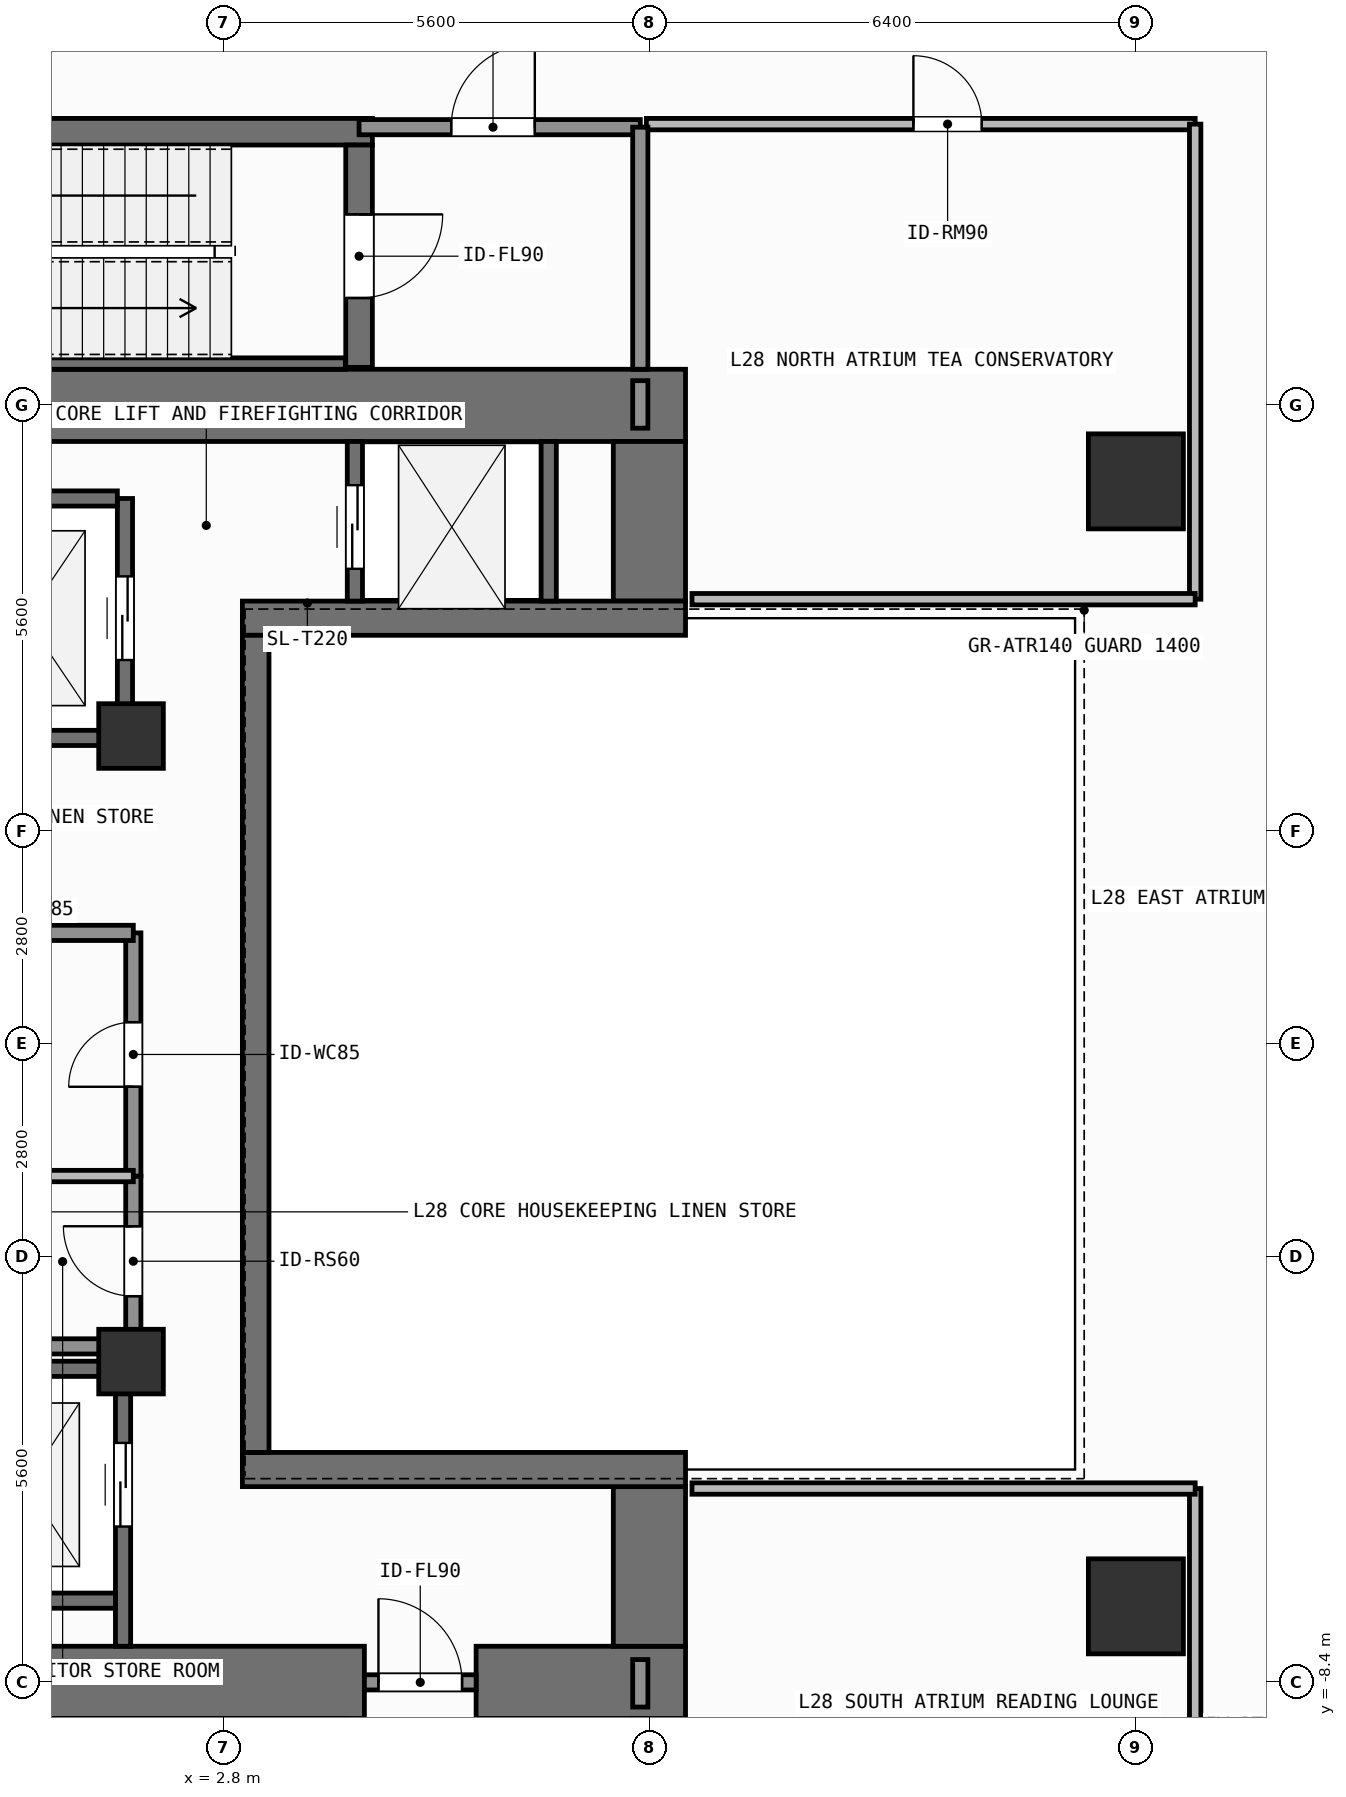
"""IFC4 building model, lengths in metres.
Left out: names, types, materials, properties, quantities, classifications, styles, units other than length and angle.
Written with IfcOpenShell. Run it as: python <this file> out.ifc"""

import sys

from ifc_helpers import new_model, si_unit, direction, frame, frame_2d, origin, origin_2d, place, context, subcontext, project, spatial, rectangle, extrude, element, fill, save


model = new_model("IFC4")
c1 = context("Model", 3, precision=1e-05, world=origin(), true_north=direction((0.0, 1.0)))
c2 = subcontext(c1, "Body", "Model", "MODEL_VIEW")
j1 = project(units=[si_unit("LENGTHUNIT", "METRE"), si_unit("PLANEANGLEUNIT", "RADIAN")], contexts=[c1])
p1 = place(None, origin())
s1 = spatial("IfcSite", under=j1, at=p1, CompositionType="ELEMENT")
p2 = place(p1, origin())
s2 = spatial("IfcBuilding", under=s1, at=p2, CompositionType="ELEMENT")
p3 = place(p2, frame((0.0, 0.0, 113.4)))
s3 = spatial("IfcBuildingStorey", under=s2, at=p3, CompositionType="ELEMENT", Elevation=113.4)
p4 = place(p3, frame((-2.62, -8.4, 0.0), z_axis=(0.0, 0.0, 1.0), x_axis=(1.0, 0.0, 0.0)))
e1 = element("IfcWall", 1, at=p4, inside=s3, PredefinedType="SHEAR", context=c2, shape_type="SweptSolid", body=[
    extrude(rectangle(XDim=7.27, YDim=0.95, at=frame_2d((3.635, 0.0))), origin(), (0.0, 0.0, 1.0), 3.9),
])
p5 = place(p3, frame((6.12, -8.4, 0.0), z_axis=(0.0, 0.0, 1.0), x_axis=(1.0, 0.0, 0.0)))
e2 = element("IfcWall", 2, at=p5, inside=s3, PredefinedType="SHEAR", context=c2, shape_type="SweptSolid", body=[
    extrude(rectangle(XDim=2.755, YDim=0.95, at=frame_2d((1.377, 0.0))), origin(), (0.0, 0.0, 1.0), 3.9),
])
p6 = place(p3, frame((-7.55, 8.4, 0.0), z_axis=(0.0, 0.0, 1.0), x_axis=(1.0, 0.0, 0.0)))
e3 = element("IfcWall", 3, at=p6, inside=s3, PredefinedType="SHEAR", context=c2, shape_type="SweptSolid", body=[
    extrude(rectangle(XDim=16.425, YDim=0.95, at=frame_2d((8.212, 0.0))), origin(), (0.0, 0.0, 1.0), 3.9),
])
for number, where, z_axis, x_axis in (
    (4, (8.4, -7.925, 0.0), (0.0, 0.0, 1.0), (0.0, 1.0, 0.0)),
    (5, (8.4, 5.825, 0.0), (0.0, 0.0, 1.0), (0.0, 1.0, 0.0)),
):
    element("IfcWall", number, at=place(p3, frame(where, z_axis=z_axis, x_axis=x_axis)), inside=s3, PredefinedType="SHEAR", context=c2, shape_type="SweptSolid", body=[
        extrude(rectangle(XDim=2.1, YDim=0.95, at=frame_2d((1.05, 0.0))), origin(), (0.0, 0.0, 1.0), 3.9),
    ])
for number, where, z_axis, x_axis in (
    (6, (3.045, -5.6, 0.0), (0.0, 0.0, 1.0), (1.0, 0.0, 0.0)),
    (7, (3.045, 5.6, 0.0), (0.0, 0.0, 1.0), (1.0, 0.0, 0.0)),
):
    element("IfcWall", number, at=place(p3, frame(where, z_axis=z_axis, x_axis=x_axis)), inside=s3, PredefinedType="SHEAR", context=c2, shape_type="SweptSolid", body=[
        extrude(rectangle(XDim=5.83, YDim=0.45, at=frame_2d((2.915, 0.0))), origin(), (0.0, 0.0, 1.0), 3.9),
    ])
p7 = place(p3, frame((3.22, -5.375, 0.0), z_axis=(0.0, 0.0, 1.0), x_axis=(0.0, 1.0, 0.0)))
e8 = element("IfcWall", 8, at=p7, inside=s3, PredefinedType="SHEAR", context=c2, shape_type="SweptSolid", body=[
    extrude(rectangle(XDim=10.75, YDim=0.35, at=frame_2d((5.375, 0.0))), origin(), (0.0, 0.0, 1.0), 3.9),
])
p8 = place(p3, frame((-2.555, 12.0, 0.0), z_axis=(0.0, 0.0, 1.0), x_axis=(1.0, 0.0, 0.0)))
e9 = element("IfcWall", 9, at=p8, inside=s3, PredefinedType="SHEAR", context=c2, shape_type="SweptSolid", body=[
    extrude(rectangle(XDim=7.31, YDim=0.35, at=frame_2d((3.655, 0.0))), origin(), (0.0, 0.0, 1.0), 3.9),
])
p9 = place(p3, frame((-2.2, 8.95, 0.0), z_axis=(0.0, 0.0, 1.0), x_axis=(1.0, 0.0, 0.0)))
e10 = element("IfcWall", 10, at=p9, inside=s3, PredefinedType="SHEAR", context=c2, shape_type="SweptSolid", body=[
    extrude(rectangle(XDim=6.6, YDim=0.15, at=frame_2d((3.3, 0.0))), origin(), (0.0, 0.0, 1.0), 3.9),
])
p10 = place(p3, frame((4.58, 11.825, 0.0), z_axis=(0.0, 0.0, 1.0), x_axis=(0.0, -1.0, 0.0)))
e11 = element("IfcWall", 11, at=p10, inside=s3, PredefinedType="SHEAR", context=c2, shape_type="SweptSolid", body=[
    extrude(rectangle(XDim=2.925, YDim=0.35, at=frame_2d((1.462, 0.0))), origin(), (0.0, 0.0, 1.0), 3.9),
])
p11 = place(p10, frame((0.913, 0.0, 0.0)))
e12 = element("IfcOpeningElement", 12, at=p11, cuts=e11, PredefinedType="OPENING", context=c2, shape_type="SweptSolid", body=[
    extrude(rectangle(XDim=1.1, YDim=2.15, at=frame_2d((0.55, 1.075))), frame((0.0, 0.185, 0.0), z_axis=(0.0, -1.0, 0.0), x_axis=(1.0, 0.0, 0.0)), (0.0, 0.0, 1.0), 0.37),
])
for number, where, z_axis, x_axis in (
    (13, (14.8, -7.4, 0.0), (0.0, 0.0, 1.0), (1.0, 0.0, 0.0)),
    (14, (14.8, 7.4, 0.0), (0.0, 0.0, 1.0), (1.0, 0.0, 0.0)),
):
    element("IfcColumn", number, at=place(p3, frame(where, z_axis=z_axis, x_axis=x_axis)), inside=s3, PredefinedType="COLUMN", context=c2, shape_type="SweptSolid", body=[
        extrude(rectangle(XDim=1.25, YDim=1.25, at=origin_2d()), origin(), (0.0, 0.0, 1.0), 3.9),
    ])
for number, where, z_axis, x_axis in (
    (15, (1.58, -4.18, 0.0), (0.0, 0.0, 1.0), (1.0, 0.0, 0.0)),
    (16, (1.58, 4.05, 0.0), (0.0, 0.0, 1.0), (1.0, 0.0, 0.0)),
):
    element("IfcColumn", number, at=place(p3, frame(where, z_axis=z_axis, x_axis=x_axis)), inside=s3, PredefinedType="COLUMN", context=c2, shape_type="SweptSolid", body=[
        extrude(rectangle(XDim=0.85, YDim=0.85, at=origin_2d()), origin(), (0.0, 0.0, 1.0), 3.9),
    ])
p12 = place(p3, frame((1.5, 4.025, 0.0), z_axis=(0.0, 0.0, 1.0), x_axis=(0.0, 1.0, 0.0)))
e17 = element("IfcWall", 17, at=p12, inside=s3, PredefinedType="SHEAR", context=c2, shape_type="SweptSolid", body=[
    extrude(rectangle(XDim=3.15, YDim=0.2, at=frame_2d((1.575, 0.0))), origin(), (0.0, 0.0, 1.0), 3.68),
])
p13 = place(p12, frame((1.025, 0.0, 0.0)))
e18 = element("IfcOpeningElement", 18, at=p13, cuts=e17, PredefinedType="OPENING", context=c2, shape_type="SweptSolid", body=[
    extrude(rectangle(XDim=1.1, YDim=2.2, at=frame_2d((0.55, 1.1))), frame((0.0, 0.11, 0.0), z_axis=(0.0, -1.0, 0.0), x_axis=(1.0, 0.0, 0.0)), (0.0, 0.0, 1.0), 0.22),
])
for number, where, z_axis, x_axis in (
    (19, (-1.0, 4.025, 0.0), (0.0, 0.0, 1.0), (1.0, 0.0, 0.0)),
    (20, (-1.0, 7.175, 0.0), (0.0, 0.0, 1.0), (1.0, 0.0, 0.0)),
):
    element("IfcWall", number, at=place(p3, frame(where, z_axis=z_axis, x_axis=x_axis)), inside=s3, PredefinedType="SHEAR", context=c2, shape_type="SweptSolid", body=[
        extrude(rectangle(XDim=2.4, YDim=0.2, at=frame_2d((1.2, 0.0))), origin(), (0.0, 0.0, 1.0), 3.68),
    ])
p14 = place(p3, frame((1.475, -7.925, 0.0), z_axis=(0.0, 0.0, 1.0), x_axis=(0.0, 1.0, 0.0)))
e21 = element("IfcWall", 21, at=p14, inside=s3, PredefinedType="SHEAR", context=c2, shape_type="SweptSolid", body=[
    extrude(rectangle(XDim=3.65, YDim=0.2, at=frame_2d((1.825, 0.0))), origin(), (0.0, 0.0, 1.0), 3.68),
])
p15 = place(p14, frame((1.575, 0.0, 0.0)))
e22 = element("IfcOpeningElement", 22, at=p15, cuts=e21, PredefinedType="OPENING", context=c2, shape_type="SweptSolid", body=[
    extrude(rectangle(XDim=1.1, YDim=2.2, at=frame_2d((0.55, 1.1))), frame((0.0, 0.11, 0.0), z_axis=(0.0, -1.0, 0.0), x_axis=(1.0, 0.0, 0.0)), (0.0, 0.0, 1.0), 0.22),
])
for number, where, z_axis, x_axis in (
    (23, (-0.975, -7.325, 0.0), (0.0, 0.0, 1.0), (1.0, 0.0, 0.0)),
    (24, (-0.975, -4.275, 0.0), (0.0, 0.0, 1.0), (1.0, 0.0, 0.0)),
):
    element("IfcWall", number, at=place(p3, frame(where, z_axis=z_axis, x_axis=x_axis)), inside=s3, PredefinedType="SHEAR", context=c2, shape_type="SweptSolid", body=[
        extrude(rectangle(XDim=2.35, YDim=0.2, at=frame_2d((1.175, 0.0))), origin(), (0.0, 0.0, 1.0), 3.68),
    ])
p16 = place(p3, frame((4.525, 5.825, 0.0), z_axis=(0.0, 0.0, 1.0), x_axis=(0.0, 1.0, 0.0)))
e25 = element("IfcWall", 25, at=p16, inside=s3, PredefinedType="SHEAR", context=c2, shape_type="SweptSolid", body=[
    extrude(rectangle(XDim=2.1, YDim=0.2, at=frame_2d((1.05, 0.0))), origin(), (0.0, 0.0, 1.0), 3.68),
])
p17 = place(p16, frame((0.425, 0.0, 0.0)))
e26 = element("IfcOpeningElement", 26, at=p17, cuts=e25, PredefinedType="OPENING", context=c2, shape_type="SweptSolid", body=[
    extrude(rectangle(XDim=1.1, YDim=2.2, at=frame_2d((0.55, 1.1))), frame((0.0, 0.11, 0.0), z_axis=(0.0, -1.0, 0.0), x_axis=(1.0, 0.0, 0.0)), (0.0, 0.0, 1.0), 0.22),
])
p18 = place(p3, frame((7.075, 5.825, 0.0), z_axis=(0.0, 0.0, 1.0), x_axis=(0.0, 1.0, 0.0)))
e27 = element("IfcWall", 27, at=p18, inside=s3, PredefinedType="SHEAR", context=c2, shape_type="SweptSolid", body=[
    extrude(rectangle(XDim=2.1, YDim=0.2, at=frame_2d((1.05, 0.0))), origin(), (0.0, 0.0, 1.0), 3.68),
])
p19 = place(p3, frame((4.65, -8.4, 0.0), z_axis=(0.0, 0.0, 1.0), x_axis=(1.0, 0.0, 0.0)))
e28 = element("IfcWall", 28, at=p19, inside=s3, PredefinedType="SOLIDWALL", context=c2, shape_type="SweptSolid", body=[
    extrude(rectangle(XDim=1.47, YDim=0.2, at=frame_2d((0.735, 0.0))), origin(), (0.0, 0.0, 1.0), 2.72),
])
p20 = place(p19, frame((0.185, 0.0, 0.0)))
e29 = element("IfcOpeningElement", 29, at=p20, cuts=e28, PredefinedType="OPENING", context=c2, shape_type="SweptSolid", body=[
    extrude(rectangle(XDim=1.1, YDim=2.15, at=frame_2d((0.55, 1.075))), frame((0.0, 0.11, 0.0), z_axis=(0.0, -1.0, 0.0), x_axis=(1.0, 0.0, 0.0)), (0.0, 0.0, 1.0), 0.22),
])
p21 = place(p3, frame((4.58, 12.06, 0.0), z_axis=(0.0, 0.0, 1.0), x_axis=(1.0, 0.0, 0.0)))
e30 = element("IfcWall", 30, at=p21, inside=s3, PredefinedType="SOLIDWALL", context=c2, shape_type="SweptSolid", body=[
    extrude(rectangle(XDim=3.7, YDim=0.2, at=frame_2d((1.85, 0.0))), origin(), (0.0, 0.0, 1.0), 3.68),
])
p22 = place(p21, frame((1.212, 0.0, 0.0)))
e31 = element("IfcOpeningElement", 31, at=p22, cuts=e30, PredefinedType="OPENING", context=c2, shape_type="SweptSolid", body=[
    extrude(rectangle(XDim=1.1, YDim=2.15, at=frame_2d((0.55, 1.075))), frame((0.0, 0.11, 0.0), z_axis=(0.0, -1.0, 0.0), x_axis=(1.0, 0.0, 0.0)), (0.0, 0.0, 1.0), 0.22),
])
p23 = place(p3, frame((1.61, -3.98, 0.0), z_axis=(0.0, 0.0, 1.0), x_axis=(0.0, 1.0, 0.0)))
e32 = element("IfcWall", 32, at=p23, inside=s3, PredefinedType="SOLIDWALL", context=c2, shape_type="SweptSolid", body=[
    extrude(rectangle(XDim=2.241, YDim=0.2, at=frame_2d((1.121, 0.0))), origin(), (0.0, 0.0, 1.0), 3.68),
])
p24 = place(p23, frame((0.66, 0.0, 0.0)))
e33 = element("IfcOpeningElement", 33, at=p24, cuts=e32, PredefinedType="OPENING", context=c2, shape_type="SweptSolid", body=[
    extrude(rectangle(XDim=0.92, YDim=2.1, at=frame_2d((0.46, 1.05))), frame((0.0, 0.11, 0.0), z_axis=(0.0, -1.0, 0.0), x_axis=(1.0, 0.0, 0.0)), (0.0, 0.0, 1.0), 0.22),
])
p25 = place(p3, frame((1.61, -1.739, 0.0), z_axis=(0.0, 0.0, 1.0), x_axis=(0.0, 1.0, 0.0)))
e34 = element("IfcWall", 34, at=p25, inside=s3, PredefinedType="SOLIDWALL", context=c2, shape_type="SweptSolid", body=[
    extrude(rectangle(XDim=3.199, YDim=0.2, at=frame_2d((1.6, 0.0))), origin(), (0.0, 0.0, 1.0), 3.68),
])
p26 = place(p25, frame((1.175, 0.0, 0.0)))
e35 = element("IfcOpeningElement", 35, at=p26, cuts=e34, PredefinedType="OPENING", context=c2, shape_type="SweptSolid", body=[
    extrude(rectangle(XDim=0.85, YDim=2.1, at=frame_2d((0.425, 1.05))), frame((0.0, 0.11, 0.0), z_axis=(0.0, -1.0, 0.0), x_axis=(1.0, 0.0, 0.0)), (0.0, 0.0, 1.0), 0.22),
])
p27 = place(p3, frame((8.36, 12.1, 0.0), z_axis=(0.0, 0.0, 1.0), x_axis=(1.0, 0.0, 0.0)))
e36 = element("IfcWall", 36, at=p27, inside=s3, PredefinedType="PARTITIONING", context=c2, shape_type="SweptSolid", body=[
    extrude(rectangle(XDim=7.22, YDim=0.15, at=frame_2d((3.61, 0.0))), origin(), (0.0, 0.0, 1.0), 3.68),
])
p28 = place(p27, frame((3.513, 0.0, 0.0)))
e37 = element("IfcOpeningElement", 37, at=p28, cuts=e36, PredefinedType="OPENING", context=c2, shape_type="SweptSolid", body=[
    extrude(rectangle(XDim=0.9, YDim=2.1, at=frame_2d((0.45, 1.05))), frame((0.0, 0.085, 0.0), z_axis=(0.0, -1.0, 0.0), x_axis=(1.0, 0.0, 0.0)), (0.0, 0.0, 1.0), 0.17),
])
p29 = place(p3, frame((8.28, 8.875, 0.0), z_axis=(0.0, 0.0, 1.0), x_axis=(0.0, 1.0, 0.0)))
e38 = element("IfcWall", 38, at=p29, inside=s3, PredefinedType="SOLIDWALL", context=c2, shape_type="SweptSolid", body=[
    extrude(rectangle(XDim=3.185, YDim=0.2, at=frame_2d((1.593, 0.0))), origin(), (0.0, 0.0, 1.0), 3.68),
])
for number, where, z_axis, x_axis in (
    (39, (-1.58, -3.98, 0.0), (0.0, 0.0, 1.0), (1.0, 0.0, 0.0)),
    (40, (-1.58, 1.46, 0.0), (0.0, 0.0, 1.0), (1.0, 0.0, 0.0)),
):
    element("IfcWall", number, at=place(p3, frame(where, z_axis=z_axis, x_axis=x_axis)), inside=s3, PredefinedType="SOLIDWALL", context=c2, shape_type="SweptSolid", body=[
        extrude(rectangle(XDim=3.19, YDim=0.2, at=frame_2d((1.595, 0.0))), origin(), (0.0, 0.0, 1.0), 3.68),
    ])
p30 = place(p3, frame((-1.58, -1.739, 0.0), z_axis=(0.0, 0.0, 1.0), x_axis=(1.0, 0.0, 0.0)))
e41 = element("IfcWall", 41, at=p30, inside=s3, PredefinedType="PARTITIONING", context=c2, shape_type="SweptSolid", body=[
    extrude(rectangle(XDim=3.19, YDim=0.15, at=frame_2d((1.595, 0.0))), origin(), (0.0, 0.0, 1.0), 3.68),
])
p31 = place(p3, frame((8.28, -8.725, 0.0), z_axis=(0.0, 0.0, 1.0), x_axis=(0.0, 1.0, 0.0)))
e42 = element("IfcWall", 42, at=p31, inside=s3, PredefinedType="SOLIDWALL", context=c2, shape_type="SweptSolid", body=[
    extrude(rectangle(XDim=0.625, YDim=0.2, at=frame_2d((0.312, 0.0))), origin(), (0.0, 0.0, 1.0), 3.68),
])
p32 = place(p3, frame((15.58, -12.1, 0.0), z_axis=(0.0, 0.0, 1.0), x_axis=(0.0, 1.0, 0.0)))
e43 = element("IfcWall", 43, at=p32, inside=s3, PredefinedType="PARTITIONING", context=c2, shape_type="SweptSolid", body=[
    extrude(rectangle(XDim=6.25, YDim=0.15, at=frame_2d((3.125, 0.0))), origin(), (0.0, 0.0, 1.0), 3.68),
])
p33 = place(p3, frame((8.96, -5.85, 0.0), z_axis=(0.0, 0.0, 1.0), x_axis=(1.0, 0.0, 0.0)))
e44 = element("IfcWall", 44, at=p33, inside=s3, PredefinedType="PARTITIONING", context=c2, shape_type="SweptSolid", body=[
    extrude(rectangle(XDim=6.62, YDim=0.15, at=frame_2d((3.31, 0.0))), origin(), (0.0, 0.0, 1.0), 3.68),
])
p34 = place(p3, frame((8.28, 8.1, 0.0), z_axis=(0.0, 0.0, 1.0), x_axis=(0.0, 1.0, 0.0)))
e45 = element("IfcWall", 45, at=p34, inside=s3, PredefinedType="SOLIDWALL", context=c2, shape_type="SweptSolid", body=[
    extrude(rectangle(XDim=0.625, YDim=0.2, at=frame_2d((0.312, 0.0))), origin(), (0.0, 0.0, 1.0), 3.68),
])
p35 = place(p3, frame((15.58, 5.85, 0.0), z_axis=(0.0, 0.0, 1.0), x_axis=(0.0, 1.0, 0.0)))
e46 = element("IfcWall", 46, at=p35, inside=s3, PredefinedType="PARTITIONING", context=c2, shape_type="SweptSolid", body=[
    extrude(rectangle(XDim=6.25, YDim=0.15, at=frame_2d((3.125, 0.0))), origin(), (0.0, 0.0, 1.0), 3.68),
])
p36 = place(p3, frame((8.96, 5.85, 0.0), z_axis=(0.0, 0.0, 1.0), x_axis=(1.0, 0.0, 0.0)))
e47 = element("IfcWall", 47, at=p36, inside=s3, PredefinedType="PARTITIONING", context=c2, shape_type="SweptSolid", body=[
    extrude(rectangle(XDim=6.62, YDim=0.15, at=frame_2d((3.31, 0.0))), origin(), (0.0, 0.0, 1.0), 3.68),
])
p37 = place(p13, origin())
e48 = element("IfcDoor", 48, at=p37, inside=s3, OperationType="SLIDING_TO_LEFT", PredefinedType="DOOR", context=c2, shape_type="SweptSolid", body=[
    extrude(rectangle(XDim=1.1, YDim=2.2, at=frame_2d((0.55, 1.1))), frame((0.0, 0.025, 0.0), z_axis=(0.0, -1.0, 0.0), x_axis=(1.0, 0.0, 0.0)), (0.0, 0.0, 1.0), 0.05),
])
fill(e18, e48)
p38 = place(p15, origin())
e49 = element("IfcDoor", 49, at=p38, inside=s3, OperationType="SLIDING_TO_LEFT", PredefinedType="DOOR", context=c2, shape_type="SweptSolid", body=[
    extrude(rectangle(XDim=1.1, YDim=2.2, at=frame_2d((0.55, 1.1))), frame((0.0, 0.025, 0.0), z_axis=(0.0, -1.0, 0.0), x_axis=(1.0, 0.0, 0.0)), (0.0, 0.0, 1.0), 0.05),
])
fill(e22, e49)
p39 = place(p17, origin())
e50 = element("IfcDoor", 50, at=p39, inside=s3, OperationType="SLIDING_TO_LEFT", PredefinedType="DOOR", context=c2, shape_type="SweptSolid", body=[
    extrude(rectangle(XDim=1.1, YDim=2.2, at=frame_2d((0.55, 1.1))), frame((0.0, 0.025, 0.0), z_axis=(0.0, -1.0, 0.0), x_axis=(1.0, 0.0, 0.0)), (0.0, 0.0, 1.0), 0.05),
])
fill(e26, e50)
p40 = place(p11, origin())
e51 = element("IfcDoor", 51, at=p40, inside=s3, OperationType="SINGLE_SWING_LEFT", PredefinedType="DOOR", context=c2, shape_type="SweptSolid", body=[
    extrude(rectangle(XDim=1.1, YDim=2.15, at=frame_2d((0.55, 1.075))), frame((0.0, 0.025, 0.0), z_axis=(0.0, -1.0, 0.0), x_axis=(1.0, 0.0, 0.0)), (0.0, 0.0, 1.0), 0.05),
])
fill(e12, e51)
p41 = place(p20, origin())
e52 = element("IfcDoor", 52, at=p41, inside=s3, OperationType="SINGLE_SWING_LEFT", PredefinedType="DOOR", context=c2, shape_type="SweptSolid", body=[
    extrude(rectangle(XDim=1.1, YDim=2.15, at=frame_2d((0.55, 1.075))), frame((0.0, 0.025, 0.0), z_axis=(0.0, -1.0, 0.0), x_axis=(1.0, 0.0, 0.0)), (0.0, 0.0, 1.0), 0.05),
])
fill(e29, e52)
p42 = place(p22, origin())
e53 = element("IfcDoor", 53, at=p42, inside=s3, OperationType="SINGLE_SWING_RIGHT", PredefinedType="DOOR", context=c2, shape_type="SweptSolid", body=[
    extrude(rectangle(XDim=1.1, YDim=2.15, at=frame_2d((0.55, 1.075))), frame((0.0, 0.025, 0.0), z_axis=(0.0, -1.0, 0.0), x_axis=(1.0, 0.0, 0.0)), (0.0, 0.0, 1.0), 0.05),
])
fill(e31, e53)
p43 = place(p24, origin())
e54 = element("IfcDoor", 54, at=p43, inside=s3, OperationType="SINGLE_SWING_RIGHT", PredefinedType="DOOR", context=c2, shape_type="SweptSolid", body=[
    extrude(rectangle(XDim=0.92, YDim=2.1, at=frame_2d((0.46, 1.05))), frame((0.0, 0.025, 0.0), z_axis=(0.0, -1.0, 0.0), x_axis=(1.0, 0.0, 0.0)), (0.0, 0.0, 1.0), 0.05),
])
fill(e33, e54)
p44 = place(p26, origin())
e55 = element("IfcDoor", 55, at=p44, inside=s3, OperationType="SINGLE_SWING_LEFT", PredefinedType="DOOR", context=c2, shape_type="SweptSolid", body=[
    extrude(rectangle(XDim=0.85, YDim=2.1, at=frame_2d((0.425, 1.05))), frame((0.0, 0.025, 0.0), z_axis=(0.0, -1.0, 0.0), x_axis=(1.0, 0.0, 0.0)), (0.0, 0.0, 1.0), 0.05),
])
fill(e35, e55)
p45 = place(p28, origin())
e56 = element("IfcDoor", 56, at=p45, inside=s3, OperationType="SINGLE_SWING_LEFT", PredefinedType="DOOR", context=c2, shape_type="SweptSolid", body=[
    extrude(rectangle(XDim=0.9, YDim=2.1, at=frame_2d((0.45, 1.05))), frame((0.0, 0.025, 0.0), z_axis=(0.0, -1.0, 0.0), x_axis=(1.0, 0.0, 0.0)), (0.0, 0.0, 1.0), 0.05),
])
fill(e37, e56)
save(model, sys.argv[1])
